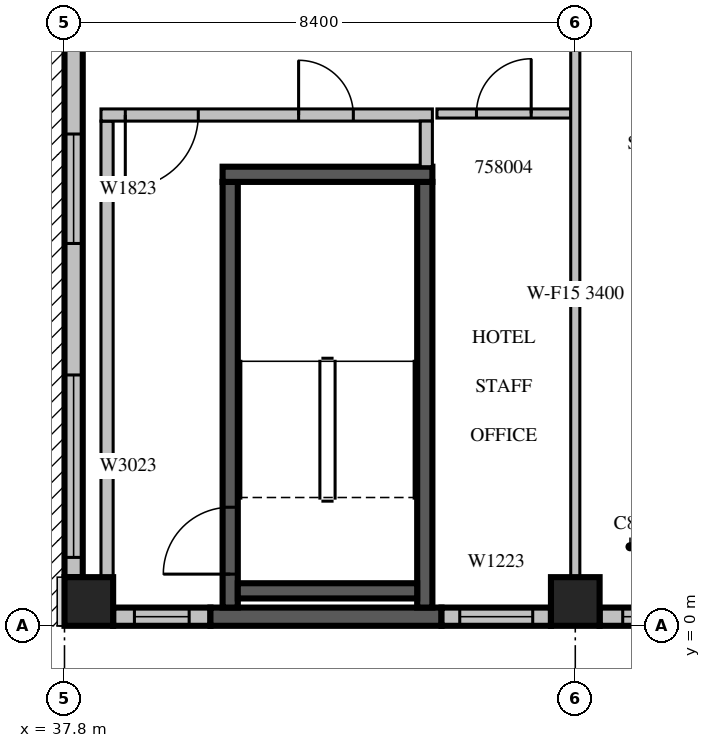
"""IFC4 building model, lengths in metres.
Left out: names, types, materials, properties, quantities, classifications, styles, units other than length and angle.
Written with IfcOpenShell. Run it as: python <this file> out.ifc"""

import sys

from ifc_helpers import new_model, si_unit, direction, frame, frame_2d, origin, origin_2d, place, context, subcontext, project, spatial, rectangle, extrude, source, transform, mapped, element, fill, save


model = new_model("IFC4")
c1 = context("Model", 3, precision=1e-05, world=origin(), true_north=direction((0.0, 1.0)))
c2 = subcontext(c1, "Body", "Model", "MODEL_VIEW")
j1 = project(units=[si_unit("LENGTHUNIT", "METRE"), si_unit("PLANEANGLEUNIT", "RADIAN")], contexts=[c1])
p1 = place(None, origin())
s1 = spatial("IfcSite", under=j1, at=p1, CompositionType="ELEMENT")
p2 = place(p1, origin())
s2 = spatial("IfcBuilding", under=s1, at=p2, CompositionType="ELEMENT")
p3 = place(p2, frame((0.0, 0.0, 253.8)))
s3 = spatial("IfcBuildingStorey", under=s2, at=p3, CompositionType="ELEMENT", Elevation=253.8)
m1 = source(origin(), c2, "Body", "SweptSolid", [
    extrude(rectangle(XDim=0.8, YDim=0.8, at=origin_2d()), origin(), (0.0, 0.0, 1.0), 3.8),
])
for number, where, z_axis, x_axis in (
    (1, (38.2, 0.4, 0.0), (0.0, 0.0, 1.0), (1.0, 0.0, 0.0)),
    (2, (46.2, 0.4, 0.0), (0.0, 0.0, 1.0), (1.0, 0.0, 0.0)),
):
    element("IfcColumn", number, at=place(p3, frame(where, z_axis=z_axis, x_axis=x_axis)), inside=s3, PredefinedType="COLUMN", context=c2, shape_type="MappedRepresentation", body=[
        mapped(m1, transform((0.0, 0.0, 0.0), scale=1.0)),
    ])
m2 = source(origin(), c2, "Body", "SweptSolid", [
    extrude(rectangle(XDim=9.3, YDim=0.3, at=frame_2d((4.65, 0.0))), origin(), (0.0, 0.0, 1.0), 3.4),
])
p4 = place(p3, frame((37.95, 10.1, 0.0), z_axis=(0.0, 0.0, 1.0), x_axis=(0.0, -1.0, 0.0)))
e3 = element("IfcWall", 3, at=p4, inside=s3, PredefinedType="STANDARD", context=c2, shape_type="MappedRepresentation", body=[
    mapped(m2, transform((0.0, 0.0, 0.0), scale=1.0)),
])
m3 = source(origin(), c2, "Body", "SweptSolid", [
    extrude(rectangle(XDim=1.8, YDim=2.3, at=frame_2d((0.9, 1.15))), frame((0.0, 0.16, 0.0), z_axis=(0.0, -1.0, 0.0), x_axis=(1.0, 0.0, 0.0)), (0.0, 0.0, 1.0), 0.32),
])
p5 = place(p4, frame((2.013, 0.0, 0.6)))
e4 = element("IfcOpeningElement", 4, at=p5, cuts=e3, PredefinedType="OPENING", context=c2, shape_type="MappedRepresentation", body=[
    mapped(m3, transform((0.0, 0.0, 0.0), scale=1.0)),
])
m4 = source(origin(), c2, "Body", "SweptSolid", [
    extrude(rectangle(XDim=3.0, YDim=2.3, at=frame_2d((1.5, 1.15))), frame((0.0, 0.16, 0.0), z_axis=(0.0, -1.0, 0.0), x_axis=(1.0, 0.0, 0.0)), (0.0, 0.0, 1.0), 0.32),
])
p6 = place(p4, frame((5.975, 0.0, 0.6)))
e5 = element("IfcOpeningElement", 5, at=p6, cuts=e3, PredefinedType="OPENING", context=c2, shape_type="MappedRepresentation", body=[
    mapped(m4, transform((0.0, 0.0, 0.0), scale=1.0)),
])
p7 = place(p3, frame((38.6, 0.15, 0.0), z_axis=(0.0, 0.0, 1.0), x_axis=(1.0, 0.0, 0.0)))
e6 = element("IfcWall", 6, at=p7, inside=s3, PredefinedType="STANDARD", context=c2, shape_type="SweptSolid", body=[
    extrude(rectangle(XDim=1.6, YDim=0.3, at=frame_2d((0.8, 0.0))), origin(), (0.0, 0.0, 1.0), 3.4),
])
m5 = source(origin(), c2, "Body", "SweptSolid", [
    extrude(rectangle(XDim=0.9, YDim=2.3, at=frame_2d((0.45, 1.15))), frame((0.0, 0.16, 0.0), z_axis=(0.0, -1.0, 0.0), x_axis=(1.0, 0.0, 0.0)), (0.0, 0.0, 1.0), 0.32),
])
p8 = place(p7, frame((0.35, 0.0, 0.6)))
e7 = element("IfcOpeningElement", 7, at=p8, cuts=e6, PredefinedType="OPENING", context=c2, shape_type="MappedRepresentation", body=[
    mapped(m5, transform((0.0, 0.0, 0.0), scale=1.0)),
])
m6 = source(origin(), c2, "Body", "SweptSolid", [
    extrude(rectangle(XDim=3.8, YDim=0.3, at=frame_2d((1.9, 0.0))), origin(), (0.0, 0.0, 1.0), 3.4),
])
p9 = place(p3, frame((40.2, 0.15, 0.0), z_axis=(0.0, 0.0, 1.0), x_axis=(1.0, 0.0, 0.0)))
e8 = element("IfcWall", 8, at=p9, inside=s3, PredefinedType="SOLIDWALL", context=c2, shape_type="MappedRepresentation", body=[
    mapped(m6, transform((0.0, 0.0, 0.0), scale=1.0)),
])
m7 = source(origin(), c2, "Body", "SweptSolid", [
    extrude(rectangle(XDim=1.8, YDim=0.3, at=frame_2d((0.9, 0.0))), origin(), (0.0, 0.0, 1.0), 3.4),
])
p10 = place(p3, frame((44.0, 0.15, 0.0), z_axis=(0.0, 0.0, 1.0), x_axis=(1.0, 0.0, 0.0)))
e9 = element("IfcWall", 9, at=p10, inside=s3, PredefinedType="STANDARD", context=c2, shape_type="MappedRepresentation", body=[
    mapped(m7, transform((0.0, 0.0, 0.0), scale=1.0)),
])
m8 = source(origin(), c2, "Body", "SweptSolid", [
    extrude(rectangle(XDim=1.2, YDim=2.3, at=frame_2d((0.6, 1.15))), frame((0.0, 0.16, 0.0), z_axis=(0.0, -1.0, 0.0), x_axis=(1.0, 0.0, 0.0)), (0.0, 0.0, 1.0), 0.32),
])
p11 = place(p10, frame((0.3, 0.0, 0.6)))
e10 = element("IfcOpeningElement", 10, at=p11, cuts=e9, PredefinedType="OPENING", context=c2, shape_type="MappedRepresentation", body=[
    mapped(m8, transform((0.0, 0.0, 0.0), scale=1.0)),
])
m9 = source(origin(), c2, "Body", "SweptSolid", [
    extrude(rectangle(XDim=2.96, YDim=0.3, at=frame_2d((1.48, 0.0))), origin(), (0.0, 0.0, 1.0), 3.4),
])
p12 = place(p3, frame((46.6, 0.15, 0.0), z_axis=(0.0, 0.0, 1.0), x_axis=(1.0, 0.0, 0.0)))
e11 = element("IfcWall", 11, at=p12, inside=s3, PredefinedType="STANDARD", context=c2, shape_type="MappedRepresentation", body=[
    mapped(m9, transform((0.0, 0.0, 0.0), scale=1.0)),
])
p13 = place(p12, frame((0.38, 0.0, 0.6)))
e12 = element("IfcOpeningElement", 12, at=p13, cuts=e11, PredefinedType="OPENING", context=c2, shape_type="MappedRepresentation", body=[
    mapped(m3, transform((0.0, 0.0, 0.0), scale=1.0)),
])
m10 = source(origin(), c2, "Body", "SweptSolid", [
    extrude(rectangle(XDim=7.0, YDim=0.25, at=frame_2d((3.5, 0.0))), origin(), (0.0, 0.0, 1.0), 3.4),
])
p14 = place(p3, frame((40.525, 0.3, 0.0), z_axis=(0.0, 0.0, 1.0), x_axis=(0.0, 1.0, 0.0)))
e13 = element("IfcWall", 13, at=p14, inside=s3, PredefinedType="SOLIDWALL", context=c2, shape_type="MappedRepresentation", body=[
    mapped(m10, transform((0.0, 0.0, 0.0), scale=1.0)),
])
m11 = source(origin(), c2, "Body", "SweptSolid", [
    extrude(rectangle(XDim=1.1, YDim=2.1, at=frame_2d((0.55, 1.05))), frame((0.0, 0.135, 0.0), z_axis=(0.0, -1.0, 0.0), x_axis=(1.0, 0.0, 0.0)), (0.0, 0.0, 1.0), 0.27),
])
p15 = place(p14, frame((0.55, 0.0, 0.0)))
e14 = element("IfcOpeningElement", 14, at=p15, cuts=e13, PredefinedType="OPENING", context=c2, shape_type="MappedRepresentation", body=[
    mapped(m11, transform((0.0, 0.0, 0.0), scale=1.0)),
])
p16 = place(p3, frame((43.725, 0.3, 0.0), z_axis=(0.0, 0.0, 1.0), x_axis=(0.0, 1.0, 0.0)))
e15 = element("IfcWall", 15, at=p16, inside=s3, PredefinedType="SOLIDWALL", context=c2, shape_type="MappedRepresentation", body=[
    mapped(m10, transform((0.0, 0.0, 0.0), scale=1.0)),
])
m12 = source(origin(), c2, "Body", "SweptSolid", [
    extrude(rectangle(XDim=3.45, YDim=0.25, at=frame_2d((1.725, 0.0))), origin(), (0.0, 0.0, 1.0), 3.4),
])
p17 = place(p3, frame((40.4, 7.425, 0.0), z_axis=(0.0, 0.0, 1.0), x_axis=(1.0, 0.0, 0.0)))
e16 = element("IfcWall", 16, at=p17, inside=s3, PredefinedType="SOLIDWALL", context=c2, shape_type="MappedRepresentation", body=[
    mapped(m12, transform((0.0, 0.0, 0.0), scale=1.0)),
])
m13 = source(origin(), c2, "Body", "SweptSolid", [
    extrude(rectangle(XDim=2.95, YDim=0.25, at=frame_2d((1.475, 0.0))), origin(), (0.0, 0.0, 1.0), 3.4),
])
p18 = place(p3, frame((40.65, 0.575, 0.0), z_axis=(0.0, 0.0, 1.0), x_axis=(1.0, 0.0, 0.0)))
e17 = element("IfcWall", 17, at=p18, inside=s3, PredefinedType="SOLIDWALL", context=c2, shape_type="MappedRepresentation", body=[
    mapped(m13, transform((0.0, 0.0, 0.0), scale=1.0)),
])
m14 = source(origin(), c2, "Body", "SweptSolid", [
    extrude(rectangle(XDim=8.0, YDim=0.2, at=frame_2d((4.0, 0.0))), origin(), (0.0, 0.0, 1.0), 3.4),
])
p19 = place(p3, frame((38.5, 0.3, 0.0), z_axis=(0.0, 0.0, 1.0), x_axis=(0.0, 1.0, 0.0)))
e18 = element("IfcWall", 18, at=p19, inside=s3, PredefinedType="PARTITIONING", context=c2, shape_type="MappedRepresentation", body=[
    mapped(m14, transform((0.0, 0.0, 0.0), scale=1.0)),
])
m15 = source(origin(), c2, "Body", "SweptSolid", [
    extrude(rectangle(XDim=5.45, YDim=0.2, at=frame_2d((2.725, 0.0))), origin(), (0.0, 0.0, 1.0), 3.4),
])
p20 = place(p3, frame((38.4, 8.4, 0.0), z_axis=(0.0, 0.0, 1.0), x_axis=(1.0, 0.0, 0.0)))
e19 = element("IfcWall", 19, at=p20, inside=s3, PredefinedType="PARTITIONING", context=c2, shape_type="MappedRepresentation", body=[
    mapped(m15, transform((0.0, 0.0, 0.0), scale=1.0)),
])
m16 = source(origin(), c2, "Body", "SweptSolid", [
    extrude(rectangle(XDim=1.2, YDim=2.1, at=frame_2d((0.6, 1.05))), frame((0.0, 0.11, 0.0), z_axis=(0.0, -1.0, 0.0), x_axis=(1.0, 0.0, 0.0)), (0.0, 0.0, 1.0), 0.22),
])
p21 = place(p20, frame((0.4, 0.0, 0.0)))
e20 = element("IfcOpeningElement", 20, at=p21, cuts=e19, PredefinedType="OPENING", context=c2, shape_type="MappedRepresentation", body=[
    mapped(m16, transform((0.0, 0.0, 0.0), scale=1.0)),
])
m17 = source(origin(), c2, "Body", "SweptSolid", [
    extrude(rectangle(XDim=0.9, YDim=2.1, at=frame_2d((0.45, 1.05))), frame((0.0, 0.11, 0.0), z_axis=(0.0, -1.0, 0.0), x_axis=(1.0, 0.0, 0.0)), (0.0, 0.0, 1.0), 0.22),
])
p22 = place(p20, frame((3.25, 0.0, 0.0)))
e21 = element("IfcOpeningElement", 21, at=p22, cuts=e19, PredefinedType="OPENING", context=c2, shape_type="MappedRepresentation", body=[
    mapped(m17, transform((0.0, 0.0, 0.0), scale=1.0)),
])
m18 = source(origin(), c2, "Body", "SweptSolid", [
    extrude(rectangle(XDim=0.75, YDim=0.2, at=frame_2d((0.375, 0.0))), origin(), (0.0, 0.0, 1.0), 3.4),
])
p23 = place(p3, frame((43.75, 7.55, 0.0), z_axis=(0.0, 0.0, 1.0), x_axis=(0.0, 1.0, 0.0)))
e22 = element("IfcWall", 22, at=p23, inside=s3, PredefinedType="PARTITIONING", context=c2, shape_type="MappedRepresentation", body=[
    mapped(m18, transform((0.0, 0.0, 0.0), scale=1.0)),
])
m19 = source(origin(), c2, "Body", "SweptSolid", [
    extrude(rectangle(XDim=2.2, YDim=0.15, at=frame_2d((1.1, 0.0))), origin(), (0.0, 0.0, 1.0), 3.4),
])
p24 = place(p3, frame((46.125, 8.425, 0.0), z_axis=(0.0, 0.0, 1.0), x_axis=(-1.0, 0.0, 0.0)))
e23 = element("IfcWall", 23, at=p24, inside=s3, PredefinedType="PARTITIONING", context=c2, shape_type="MappedRepresentation", body=[
    mapped(m19, transform((0.0, 0.0, 0.0), scale=1.0)),
])
m20 = source(origin(), c2, "Body", "SweptSolid", [
    extrude(rectangle(XDim=0.9, YDim=2.1, at=frame_2d((0.45, 1.05))), frame((0.0, 0.085, 0.0), z_axis=(0.0, -1.0, 0.0), x_axis=(1.0, 0.0, 0.0)), (0.0, 0.0, 1.0), 0.17),
])
p25 = place(p24, frame((0.65, 0.0, 0.0)))
e24 = element("IfcOpeningElement", 24, at=p25, cuts=e23, PredefinedType="OPENING", context=c2, shape_type="MappedRepresentation", body=[
    mapped(m20, transform((0.0, 0.0, 0.0), scale=1.0)),
])
m21 = source(origin(), c2, "Body", "SweptSolid", [
    extrude(rectangle(XDim=9.302, YDim=0.15, at=frame_2d((4.651, 0.0))), origin(), (0.0, 0.0, 1.0), 3.4),
])
p26 = place(p3, frame((46.2, 0.799, 0.0), z_axis=(0.0, 0.0, 1.0), x_axis=(0.0, 1.0, 0.0)))
e25 = element("IfcWall", 25, at=p26, inside=s3, PredefinedType="PARTITIONING", context=c2, shape_type="MappedRepresentation", body=[
    mapped(m21, transform((0.0, 0.0, 0.0), scale=1.0)),
])
m22 = source(origin(), c2, "Body", "SweptSolid", [
    extrude(rectangle(XDim=1.8, YDim=2.3, at=frame_2d((0.9, 1.15))), frame((0.0, 0.03, 0.0), z_axis=(0.0, -1.0, 0.0), x_axis=(1.0, 0.0, 0.0)), (0.0, 0.0, 1.0), 0.06),
])
p27 = place(p5, origin())
e26 = element("IfcWindow", 26, at=p27, inside=s3, PartitioningType="SINGLE_PANEL", PredefinedType="WINDOW", context=c2, shape_type="MappedRepresentation", body=[
    mapped(m22, transform((0.0, 0.0, 0.0), scale=1.0)),
])
fill(e4, e26)
m23 = source(origin(), c2, "Body", "SweptSolid", [
    extrude(rectangle(XDim=3.0, YDim=2.3, at=frame_2d((1.5, 1.15))), frame((0.0, 0.03, 0.0), z_axis=(0.0, -1.0, 0.0), x_axis=(1.0, 0.0, 0.0)), (0.0, 0.0, 1.0), 0.06),
])
p28 = place(p6, origin())
e27 = element("IfcWindow", 27, at=p28, inside=s3, PartitioningType="SINGLE_PANEL", PredefinedType="WINDOW", context=c2, shape_type="MappedRepresentation", body=[
    mapped(m23, transform((0.0, 0.0, 0.0), scale=1.0)),
])
fill(e5, e27)
m24 = source(origin(), c2, "Body", "SweptSolid", [
    extrude(rectangle(XDim=0.9, YDim=2.3, at=frame_2d((0.45, 1.15))), frame((0.0, 0.03, 0.0), z_axis=(0.0, -1.0, 0.0), x_axis=(1.0, 0.0, 0.0)), (0.0, 0.0, 1.0), 0.06),
])
p29 = place(p8, origin())
e28 = element("IfcWindow", 28, at=p29, inside=s3, PartitioningType="SINGLE_PANEL", PredefinedType="WINDOW", context=c2, shape_type="MappedRepresentation", body=[
    mapped(m24, transform((0.0, 0.0, 0.0), scale=1.0)),
])
fill(e7, e28)
m25 = source(origin(), c2, "Body", "SweptSolid", [
    extrude(rectangle(XDim=1.2, YDim=2.3, at=frame_2d((0.6, 1.15))), frame((0.0, 0.03, 0.0), z_axis=(0.0, -1.0, 0.0), x_axis=(1.0, 0.0, 0.0)), (0.0, 0.0, 1.0), 0.06),
])
p30 = place(p11, origin())
e29 = element("IfcWindow", 29, at=p30, inside=s3, PartitioningType="SINGLE_PANEL", PredefinedType="WINDOW", context=c2, shape_type="MappedRepresentation", body=[
    mapped(m25, transform((0.0, 0.0, 0.0), scale=1.0)),
])
fill(e10, e29)
p31 = place(p13, origin())
e30 = element("IfcWindow", 30, at=p31, inside=s3, PartitioningType="SINGLE_PANEL", PredefinedType="WINDOW", context=c2, shape_type="MappedRepresentation", body=[
    mapped(m22, transform((0.0, 0.0, 0.0), scale=1.0)),
])
fill(e12, e30)
m26 = source(origin(), c2, "Body", "SweptSolid", [
    extrude(rectangle(XDim=1.1, YDim=2.1, at=frame_2d((0.55, 1.05))), frame((0.0, 0.025, 0.0), z_axis=(0.0, -1.0, 0.0), x_axis=(1.0, 0.0, 0.0)), (0.0, 0.0, 1.0), 0.05),
])
p32 = place(p15, origin())
e31 = element("IfcDoor", 31, at=p32, inside=s3, OperationType="SINGLE_SWING_LEFT", PredefinedType="DOOR", context=c2, shape_type="MappedRepresentation", body=[
    mapped(m26, transform((0.0, 0.0, 0.0), scale=1.0)),
])
fill(e14, e31)
m27 = source(origin(), c2, "Body", "SweptSolid", [
    extrude(rectangle(XDim=1.2, YDim=2.1, at=frame_2d((0.6, 1.05))), frame((0.0, 0.025, 0.0), z_axis=(0.0, -1.0, 0.0), x_axis=(1.0, 0.0, 0.0)), (0.0, 0.0, 1.0), 0.05),
])
p33 = place(p21, origin())
e32 = element("IfcDoor", 32, at=p33, inside=s3, OperationType="SINGLE_SWING_RIGHT", PredefinedType="DOOR", context=c2, shape_type="MappedRepresentation", body=[
    mapped(m27, transform((0.0, 0.0, 0.0), scale=1.0)),
])
fill(e20, e32)
m28 = source(origin(), c2, "Body", "SweptSolid", [
    extrude(rectangle(XDim=0.9, YDim=2.1, at=frame_2d((0.45, 1.05))), frame((0.0, 0.025, 0.0), z_axis=(0.0, -1.0, 0.0), x_axis=(1.0, 0.0, 0.0)), (0.0, 0.0, 1.0), 0.05),
])
p34 = place(p22, origin())
e33 = element("IfcDoor", 33, at=p34, inside=s3, OperationType="SINGLE_SWING_LEFT", PredefinedType="DOOR", context=c2, shape_type="MappedRepresentation", body=[
    mapped(m28, transform((0.0, 0.0, 0.0), scale=1.0)),
])
fill(e21, e33)
p35 = place(p25, origin())
e34 = element("IfcDoor", 34, at=p35, inside=s3, OperationType="SINGLE_SWING_RIGHT", PredefinedType="DOOR", context=c2, shape_type="MappedRepresentation", body=[
    mapped(m28, transform((0.0, 0.0, 0.0), scale=1.0)),
])
fill(e24, e34)
save(model, sys.argv[1])
